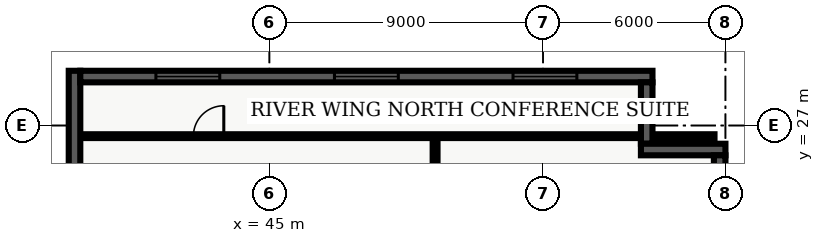
"""IFC4 building model, lengths in metres.
Left out: names, types, materials, properties, quantities, classifications, styles, units other than length and angle.
Written with IfcOpenShell. Run it as: python <this file> out.ifc"""

import sys

from ifc_helpers import new_model, entity, si_unit, converted_unit, direction, frame, origin_with_axes, origin_2d_with_axis, place, context, subcontext, project, spatial, polyline, rectangle, outline, extrude, element, fill, save


model = new_model("IFC4")
c1 = context("Model", 3, precision=1e-05, world=origin_with_axes(), true_north=direction((0.0, 1.0)))
c2 = subcontext(c1, "Body", "Model", "MODEL_VIEW")
j1 = project(units=[si_unit("LENGTHUNIT", "METRE"), converted_unit("PLANEANGLEUNIT", "DEGREE", entity("IfcPlaneAngleMeasure", 0.017), si_unit("PLANEANGLEUNIT", "RADIAN"), dimensions=[0, 0, 0, 0, 0, 0, 0])], contexts=[c1])
p1 = place(None, origin_with_axes())
s1 = spatial("IfcSite", under=j1, at=p1, CompositionType="ELEMENT")
p2 = place(p1, origin_with_axes())
s2 = spatial("IfcBuilding", under=s1, at=p2, CompositionType="ELEMENT")
p3 = place(p2, frame((0.0, 0.0, 124.2), z_axis=(0.0, 0.0, 1.0), x_axis=(1.0, 0.0, 0.0)))
s3 = spatial("IfcBuildingStorey", under=s2, at=p3, CompositionType="ELEMENT", Elevation=124.2)
p4 = place(p3, frame((50.45, 7.85, 0.0), z_axis=(0.0, 0.0, 1.0), x_axis=(0.0, 1.0, 0.0)))
e1 = element("IfcWall", 1, at=p4, inside=s3, PredefinedType="PARTITIONING", context=c2, shape_type="SweptSolid", body=[
    extrude(outline(polyline([(0.0, -0.08), (18.8, -0.08), (18.8, 0.08), (0.0, 0.08), (0.0, -0.08)])), origin_with_axes(), (0.0, 0.0, 1.0), 3.2),
])
p5 = place(p4, frame((4.33, 0.0, 0.0), z_axis=(0.0, 0.0, 1.0), x_axis=(1.0, 0.0, 0.0)))
e2 = element("IfcOpeningElement", 2, at=p5, cuts=e1, PredefinedType="OPENING", context=c2, shape_type="SweptSolid", body=[
    extrude(rectangle(XDim=1.0, YDim=0.18, at=origin_2d_with_axis()), origin_with_axes(), (0.0, 0.0, 1.0), 2.15),
])
p6 = place(p4, frame((13.671, 0.0, 0.0), z_axis=(0.0, 0.0, 1.0), x_axis=(1.0, 0.0, 0.0)))
e3 = element("IfcOpeningElement", 3, at=p6, cuts=e1, PredefinedType="OPENING", context=c2, shape_type="SweptSolid", body=[
    extrude(rectangle(XDim=1.0, YDim=0.18, at=origin_2d_with_axis()), origin_with_axes(), (0.0, 0.0, 1.0), 2.15),
])
p7 = place(p3, frame((38.76, 26.65, 0.0), z_axis=(0.0, 0.0, 1.0), x_axis=(1.0, 0.0, 0.0)))
e4 = element("IfcWall", 4, at=p7, inside=s3, PredefinedType="PARTITIONING", context=c2, shape_type="SweptSolid", body=[
    extrude(outline(polyline([(0.0, -0.062), (20.88, -0.062), (20.88, 0.062), (0.0, 0.062), (0.0, -0.062)])), origin_with_axes(), (0.0, 0.0, 1.0), 3.2),
])
p8 = place(p7, frame((4.24, 0.0, 0.0), z_axis=(0.0, 0.0, 1.0), x_axis=(1.0, 0.0, 0.0)))
e5 = element("IfcOpeningElement", 5, at=p8, cuts=e4, PredefinedType="OPENING", context=c2, shape_type="SweptSolid", body=[
    extrude(rectangle(XDim=1.0, YDim=0.145, at=origin_2d_with_axis()), origin_with_axes(), (0.0, 0.0, 1.0), 2.15),
])
p9 = place(p3, frame((38.59, 21.22, 0.0), z_axis=(0.0, 0.0, 1.0), x_axis=(0.0, 1.0, 0.0)))
e6 = element("IfcWall", 6, at=p9, inside=s3, PredefinedType="SOLIDWALL", context=c2, shape_type="SweptSolid", body=[
    extrude(outline(polyline([(0.0, -0.19), (7.58, -0.19), (7.58, 0.19), (0.0, 0.19), (0.0, -0.19)])), origin_with_axes(), (0.0, 0.0, 1.0), 4.56),
])
p10 = place(p3, frame((38.78, 28.61, 0.0), z_axis=(0.0, 0.0, 1.0), x_axis=(1.0, 0.0, 0.0)))
e7 = element("IfcWall", 7, at=p10, inside=s3, PredefinedType="SOLIDWALL", context=c2, shape_type="SweptSolid", body=[
    extrude(outline(polyline([(0.0, -0.19), (18.82, -0.19), (18.82, 0.19), (0.0, 0.19), (0.0, -0.19)])), origin_with_axes(), (0.0, 0.0, 1.0), 4.56),
])
p11 = place(p10, frame((3.537, 0.0, 0.45), z_axis=(0.0, 0.0, 1.0), x_axis=(1.0, 0.0, 0.0)))
e8 = element("IfcOpeningElement", 8, at=p11, cuts=e7, PredefinedType="OPENING", context=c2, shape_type="SweptSolid", body=[
    extrude(rectangle(XDim=2.1, YDim=0.4, at=origin_2d_with_axis()), origin_with_axes(), (0.0, 0.0, 1.0), 2.2),
])
p12 = place(p10, frame((9.41, 0.0, 0.45), z_axis=(0.0, 0.0, 1.0), x_axis=(1.0, 0.0, 0.0)))
e9 = element("IfcOpeningElement", 9, at=p12, cuts=e7, PredefinedType="OPENING", context=c2, shape_type="SweptSolid", body=[
    extrude(rectangle(XDim=2.1, YDim=0.4, at=origin_2d_with_axis()), origin_with_axes(), (0.0, 0.0, 1.0), 2.2),
])
p13 = place(p10, frame((15.283, 0.0, 0.45), z_axis=(0.0, 0.0, 1.0), x_axis=(1.0, 0.0, 0.0)))
e10 = element("IfcOpeningElement", 10, at=p13, cuts=e7, PredefinedType="OPENING", context=c2, shape_type="SweptSolid", body=[
    extrude(rectangle(XDim=2.1, YDim=0.4, at=origin_2d_with_axis()), origin_with_axes(), (0.0, 0.0, 1.0), 2.2),
])
p14 = place(p3, frame((57.41, 28.42, 0.0), z_axis=(0.0, 0.0, 1.0), x_axis=(0.0, -1.0, 0.0)))
e11 = element("IfcWall", 11, at=p14, inside=s3, PredefinedType="SOLIDWALL", context=c2, shape_type="SweptSolid", body=[
    extrude(outline(polyline([(0.0, -0.19), (2.02, -0.19), (2.02, 0.19), (0.0, 0.19), (0.0, -0.19)])), origin_with_axes(), (0.0, 0.0, 1.0), 4.56),
])
p15 = place(p3, frame((57.22, 26.21, 0.0), z_axis=(0.0, 0.0, 1.0), x_axis=(1.0, 0.0, 0.0)))
e12 = element("IfcWall", 12, at=p15, inside=s3, PredefinedType="SOLIDWALL", context=c2, shape_type="SweptSolid", body=[
    extrude(outline(polyline([(0.0, -0.19), (2.78, -0.19), (2.78, 0.19), (0.0, 0.19), (0.0, -0.19)])), origin_with_axes(), (0.0, 0.0, 1.0), 4.56),
])
p16 = place(p3, frame((59.81, 26.02, 0.0), z_axis=(0.0, 0.0, 1.0), x_axis=(0.0, -1.0, 0.0)))
e13 = element("IfcWall", 13, at=p16, inside=s3, PredefinedType="SOLIDWALL", context=c2, shape_type="SweptSolid", body=[
    extrude(outline(polyline([(0.0, -0.19), (23.62, -0.19), (23.62, 0.19), (0.0, 0.19), (0.0, -0.19)])), origin_with_axes(), (0.0, 0.0, 1.0), 4.56),
])
p17 = place(p16, frame((3.853, 0.0, 0.45), z_axis=(0.0, 0.0, 1.0), x_axis=(1.0, 0.0, 0.0)))
e14 = element("IfcOpeningElement", 14, at=p17, cuts=e13, PredefinedType="OPENING", context=c2, shape_type="SweptSolid", body=[
    extrude(rectangle(XDim=2.1, YDim=0.4, at=origin_2d_with_axis()), origin_with_axes(), (0.0, 0.0, 1.0), 2.2),
])
p18 = place(p16, frame((20.218, 0.0, 0.45), z_axis=(0.0, 0.0, 1.0), x_axis=(1.0, 0.0, 0.0)))
e15 = element("IfcOpeningElement", 15, at=p18, cuts=e13, PredefinedType="OPENING", context=c2, shape_type="SweptSolid", body=[
    extrude(rectangle(XDim=2.1, YDim=0.4, at=origin_2d_with_axis()), origin_with_axes(), (0.0, 0.0, 1.0), 2.2),
])
p19 = place(p7, frame((4.24, 0.0, 0.0), z_axis=(0.0, 0.0, 1.0), x_axis=(1.0, 0.0, 0.0)))
e16 = element("IfcDoor", 16, at=p19, inside=s3, OperationType="SINGLE_SWING_RIGHT", PredefinedType="DOOR", context=c2, shape_type="SweptSolid", body=[
    extrude(rectangle(XDim=1.0, YDim=0.075, at=origin_2d_with_axis()), origin_with_axes(), (0.0, 0.0, 1.0), 2.15),
])
fill(e5, e16)
p20 = place(p10, frame((3.537, 0.0, 0.45), z_axis=(0.0, 0.0, 1.0), x_axis=(1.0, 0.0, 0.0)))
e17 = element("IfcWindow", 17, at=p20, inside=s3, PredefinedType="WINDOW", context=c2, shape_type="SweptSolid", body=[
    extrude(rectangle(XDim=2.1, YDim=0.09, at=origin_2d_with_axis()), origin_with_axes(), (0.0, 0.0, 1.0), 2.2),
])
fill(e8, e17)
p21 = place(p10, frame((9.41, 0.0, 0.45), z_axis=(0.0, 0.0, 1.0), x_axis=(1.0, 0.0, 0.0)))
e18 = element("IfcWindow", 18, at=p21, inside=s3, PredefinedType="WINDOW", context=c2, shape_type="SweptSolid", body=[
    extrude(rectangle(XDim=2.1, YDim=0.09, at=origin_2d_with_axis()), origin_with_axes(), (0.0, 0.0, 1.0), 2.2),
])
fill(e9, e18)
p22 = place(p10, frame((15.283, 0.0, 0.45), z_axis=(0.0, 0.0, 1.0), x_axis=(1.0, 0.0, 0.0)))
e19 = element("IfcWindow", 19, at=p22, inside=s3, PredefinedType="WINDOW", context=c2, shape_type="SweptSolid", body=[
    extrude(rectangle(XDim=2.1, YDim=0.09, at=origin_2d_with_axis()), origin_with_axes(), (0.0, 0.0, 1.0), 2.2),
])
fill(e10, e19)
save(model, sys.argv[1])
